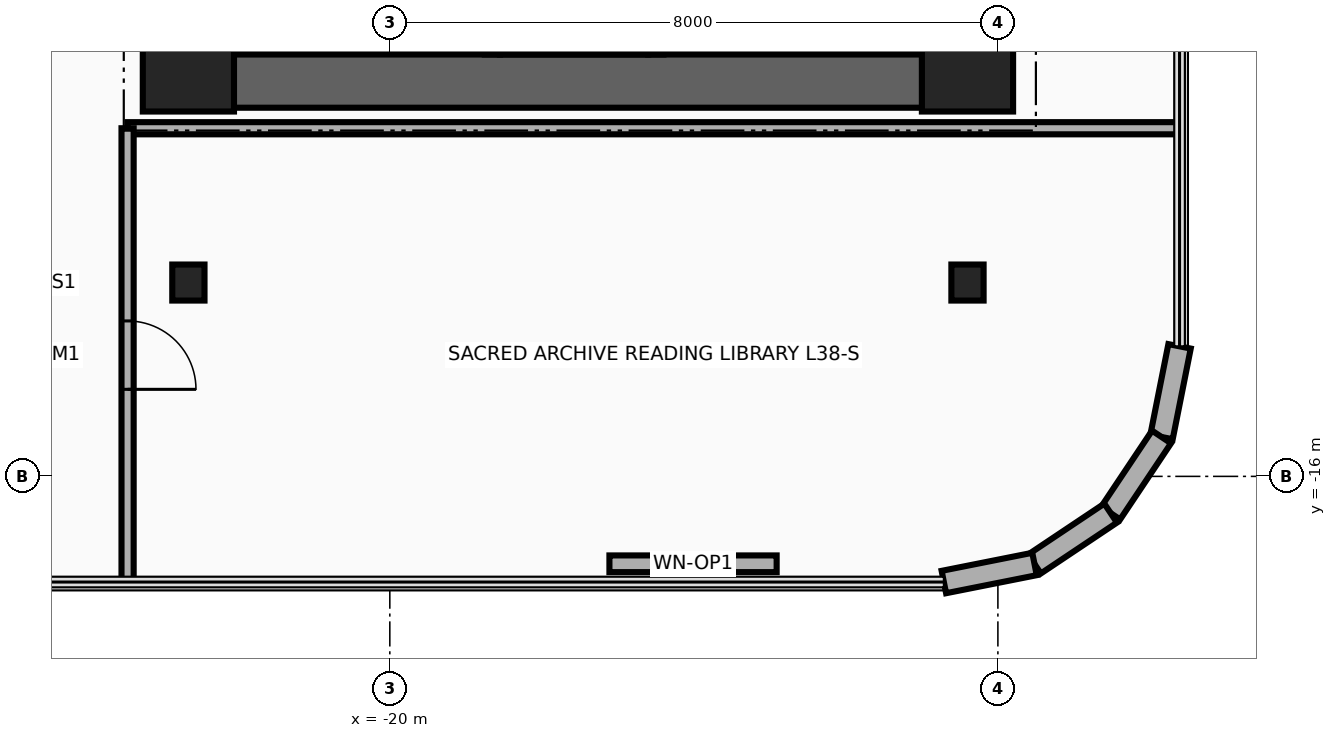
"""IFC4 building model, lengths in metres.
Left out: names, types, materials, properties, quantities, classifications, styles, units other than length and angle.
Written with IfcOpenShell. Run it as: python <this file> out.ifc"""

import sys

from ifc_helpers import new_model, si_unit, direction, frame, frame_2d, origin, origin_2d, place, context, subcontext, project, spatial, rectangle, i_section, extrude, source, transform, mapped, element, fill, save


model = new_model("IFC4")
c1 = context("Model", 3, precision=1e-05, world=origin(), true_north=direction((0.0, 1.0)))
c2 = subcontext(c1, "Body", "Model", "MODEL_VIEW")
j1 = project(units=[si_unit("LENGTHUNIT", "METRE"), si_unit("PLANEANGLEUNIT", "RADIAN")], contexts=[c1])
p1 = place(None, origin())
s1 = spatial("IfcSite", under=j1, at=p1, CompositionType="ELEMENT")
p2 = place(p1, origin())
s2 = spatial("IfcBuilding", under=s1, at=p2, CompositionType="ELEMENT")
p3 = place(p2, frame((0.0, 0.0, 150.1)))
s3 = spatial("IfcBuildingStorey", under=s2, at=p3, CompositionType="ELEMENT", Elevation=150.1)
for number, where, z_axis, x_axis in (
    (1, (-22.16, -10.45, 0.0), (0.0, 0.0, 1.0), (0.0, 1.0, 0.0)),
    (2, (-18.83, -10.45, 0.0), (0.0, 0.0, 1.0), (0.0, 1.0, 0.0)),
):
    element("IfcWall", number, at=place(p3, frame(where, z_axis=z_axis, x_axis=x_axis)), inside=s3, PredefinedType="SHEAR", context=c2, shape_type="SweptSolid", body=[
        extrude(rectangle(XDim=8.67, YDim=0.22, at=frame_2d((4.335, 0.0))), origin(), (0.0, 0.0, 1.0), 3.46),
    ])
p4 = place(p3, frame((-22.65, -11.15, 0.0), z_axis=(0.0, 0.0, 1.0), x_axis=(0.0, 1.0, 0.0)))
e3 = element("IfcWall", 3, at=p4, inside=s3, PredefinedType="SHEAR", context=c2, shape_type="SweptSolid", body=[
    extrude(rectangle(XDim=22.3, YDim=0.7, at=frame_2d((11.15, 0.0))), origin(), (0.0, 0.0, 1.0), 3.46),
])
p5 = place(p3, frame((-22.65, -10.8, 0.0), z_axis=(0.0, 0.0, 1.0), x_axis=(1.0, 0.0, 0.0)))
e4 = element("IfcWall", 4, at=p5, inside=s3, PredefinedType="SHEAR", context=c2, shape_type="SweptSolid", body=[
    extrude(rectangle(XDim=10.25, YDim=0.7, at=frame_2d((5.125, 0.0))), origin(), (0.0, 0.0, 1.0), 3.46),
])
m1 = source(origin(), c2, "Body", "SweptSolid", [
    extrude(rectangle(XDim=1.2, YDim=1.2, at=origin_2d()), origin(), (0.0, 0.0, 1.0), 3.7),
])
for number, where, z_axis, x_axis in (
    (5, (-22.65, -10.6, 0.0), (0.0, 0.0, 1.0), (1.0, 0.0, 0.0)),
    (6, (-12.4, -10.6, 0.0), (0.0, 0.0, 1.0), (1.0, 0.0, 0.0)),
):
    element("IfcColumn", number, at=place(p3, frame(where, z_axis=z_axis, x_axis=x_axis)), inside=s3, PredefinedType="COLUMN", context=c2, shape_type="MappedRepresentation", body=[
        mapped(m1, transform((0.0, 0.0, 0.0), x_axis=(1.0, 0.0, 0.0), y_axis=(0.0, 1.0, 0.0), z_axis=(0.0, 0.0, 1.0), scale=1.0)),
    ])
m2 = source(origin(), c2, "Body", "SweptSolid", [
    extrude(i_section(OverallWidth=0.424, OverallDepth=0.474, WebThickness=0.048, FlangeThickness=0.077, at=origin_2d()), origin(), (0.0, 0.0, 1.0), 3.7),
])
for number, where, z_axis, x_axis in (
    (7, (-22.65, -13.45, 0.0), (0.0, 0.0, 1.0), (1.0, 0.0, 0.0)),
    (8, (-12.4, -13.45, 0.0), (0.0, 0.0, 1.0), (1.0, 0.0, 0.0)),
):
    element("IfcColumn", number, at=place(p3, frame(where, z_axis=z_axis, x_axis=x_axis)), inside=s3, PredefinedType="COLUMN", context=c2, shape_type="MappedRepresentation", body=[
        mapped(m2, transform((0.0, 0.0, 0.0), x_axis=(1.0, 0.0, 0.0), y_axis=(0.0, 1.0, 0.0), z_axis=(0.0, 0.0, 1.0), scale=1.0)),
    ])
p6 = place(p3, frame((-9.61, -14.289, 0.0), z_axis=(0.0, 0.0, 1.0), x_axis=(-0.194996050505, -0.980804027463, 0.0)))
e9 = element("IfcWall", 9, at=p6, inside=s3, PredefinedType="SOLIDWALL", context=c2, shape_type="SweptSolid", body=[
    extrude(rectangle(XDim=1.216, YDim=0.3, at=frame_2d((0.608, 0.0))), origin(), (0.0, 0.0, 1.0), 3.46),
])
for number, where, z_axis, x_axis in (
    (10, (-9.847, -15.482, 0.0), (0.0, 0.0, 1.0), (-0.556, -0.831, 0.0)),
    (11, (-10.517, -16.483, 0.0), (0.0, 0.0, 1.0), (-0.831, -0.556, 0.0)),
):
    element("IfcWall", number, at=place(p3, frame(where, z_axis=z_axis, x_axis=x_axis)), inside=s3, PredefinedType="SOLIDWALL", context=c2, shape_type="SweptSolid", body=[
        extrude(rectangle(XDim=1.205, YDim=0.3, at=frame_2d((0.603, 0.0))), origin(), (0.0, 0.0, 1.0), 3.46),
    ])
p7 = place(p3, frame((-11.518, -17.153, 0.0), z_axis=(0.0, 0.0, 1.0), x_axis=(-0.980804027463, -0.194996050505, 0.0)))
e12 = element("IfcWall", 12, at=p7, inside=s3, PredefinedType="SOLIDWALL", context=c2, shape_type="SweptSolid", body=[
    extrude(rectangle(XDim=1.216, YDim=0.3, at=frame_2d((0.608, 0.0))), origin(), (0.0, 0.0, 1.0), 3.46),
])
p8 = place(p3, frame((-14.911, -17.15, 0.0), z_axis=(0.0, 0.0, 1.0), x_axis=(-1.0, 0.0, 0.0)))
e13 = element("IfcWall", 13, at=p8, inside=s3, PredefinedType="SOLIDWALL", context=c2, shape_type="SweptSolid", body=[
    extrude(rectangle(XDim=2.2, YDim=0.22, at=frame_2d((1.1, 0.0))), origin(), (0.0, 0.0, 1.0), 3.46),
])
p9 = place(p8, frame((0.65, 0.0, 0.95)))
e14 = element("IfcOpeningElement", 14, at=p9, cuts=e13, PredefinedType="OPENING", context=c2, shape_type="SweptSolid", body=[
    extrude(rectangle(XDim=0.9, YDim=1.3, at=frame_2d((0.45, 0.65))), frame((0.0, 0.125, 0.0), z_axis=(0.0, -1.0, 0.0), x_axis=(1.0, 0.0, 0.0)), (0.0, 0.0, 1.0), 0.25),
])
for number, where, z_axis, x_axis in (
    (15, (-18.65, -10.45, 0.0), (0.0, 0.0, 1.0), (0.0, 1.0, 0.0)),
    (16, (-16.5, -10.45, 0.0), (0.0, 0.0, 1.0), (0.0, 1.0, 0.0)),
):
    element("IfcWall", number, at=place(p3, frame(where, z_axis=z_axis, x_axis=x_axis)), inside=s3, PredefinedType="MOVABLE", context=c2, shape_type="SweptSolid", body=[
        extrude(rectangle(XDim=2.35, YDim=0.2, at=frame_2d((1.175, 0.0))), origin(), (0.0, 0.0, 1.0), 2.666),
    ])
p10 = place(p3, frame((-18.55, -10.35, 0.0), z_axis=(0.0, 0.0, 1.0), x_axis=(1.0, 0.0, 0.0)))
e17 = element("IfcWall", 17, at=p10, inside=s3, PredefinedType="MOVABLE", context=c2, shape_type="SweptSolid", body=[
    extrude(rectangle(XDim=1.95, YDim=0.2, at=frame_2d((0.975, 0.0))), origin(), (0.0, 0.0, 1.0), 2.666),
])
p11 = place(p3, frame((-23.45, -11.42, 0.0), z_axis=(0.0, 0.0, 1.0), x_axis=(1.0, 0.0, 0.0)))
e18 = element("IfcWall", 18, at=p11, inside=s3, PredefinedType="PARTITIONING", context=c2, shape_type="SweptSolid", body=[
    extrude(rectangle(XDim=13.84, YDim=0.16, at=frame_2d((6.92, 0.0))), origin(), (0.0, 0.0, 1.0), 2.834),
])
p12 = place(p3, frame((-23.45, -17.39, 0.0), z_axis=(0.0, 0.0, 1.0), x_axis=(0.0, 1.0, 0.0)))
e19 = element("IfcWall", 19, at=p12, inside=s3, PredefinedType="PARTITIONING", context=c2, shape_type="SweptSolid", body=[
    extrude(rectangle(XDim=5.97, YDim=0.16, at=frame_2d((2.985, 0.0))), origin(), (0.0, 0.0, 1.0), 3.46),
])
p13 = place(p12, frame((2.535, 0.0, 0.0)))
e20 = element("IfcOpeningElement", 20, at=p13, cuts=e19, PredefinedType="OPENING", context=c2, shape_type="SweptSolid", body=[
    extrude(rectangle(XDim=0.9, YDim=2.1, at=frame_2d((0.45, 1.05))), frame((0.0, 0.095, 0.0), z_axis=(0.0, -1.0, 0.0), x_axis=(1.0, 0.0, 0.0)), (0.0, 0.0, 1.0), 0.19),
])
p14 = place(p9, origin())
e21 = element("IfcWindow", 21, at=p14, inside=s3, PartitioningType="SINGLE_PANEL", PredefinedType="WINDOW", context=c2, shape_type="SweptSolid", body=[
    extrude(rectangle(XDim=0.9, YDim=1.3, at=frame_2d((0.45, 0.65))), frame((0.0, 0.03, 0.0), z_axis=(0.0, -1.0, 0.0), x_axis=(1.0, 0.0, 0.0)), (0.0, 0.0, 1.0), 0.06),
])
fill(e14, e21)
p15 = place(p13, frame((0.9, 0.0, 0.0), z_axis=(0.0, 0.0, 1.0), x_axis=(-1.0, 0.0, 0.0)))
e22 = element("IfcDoor", 22, at=p15, inside=s3, OperationType="SINGLE_SWING_LEFT", PredefinedType="DOOR", context=c2, shape_type="SweptSolid", body=[
    extrude(rectangle(XDim=0.9, YDim=2.1, at=frame_2d((0.45, 1.05))), frame((0.0, 0.025, 0.0), z_axis=(0.0, -1.0, 0.0), x_axis=(1.0, 0.0, 0.0)), (0.0, 0.0, 1.0), 0.05),
])
fill(e20, e22)
save(model, sys.argv[1])
